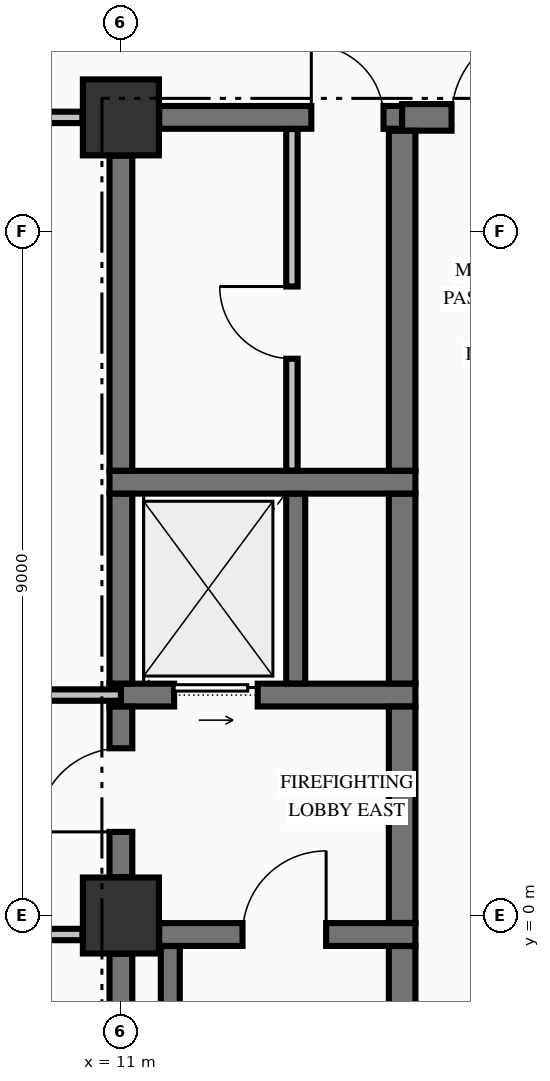
"""IFC4 building model, lengths in metres.
Left out: names, types, materials, properties, quantities, classifications, styles, units other than length and angle.
Written with IfcOpenShell. Run it as: python <this file> out.ifc"""

import sys

from ifc_helpers import new_model, si_unit, direction, frame, frame_2d, origin, origin_2d, place, context, subcontext, project, spatial, rectangle, extrude, element, fill, save


model = new_model("IFC4")
c1 = context("Model", 3, precision=1e-05, world=origin(), true_north=direction((0.0, 1.0)))
c2 = subcontext(c1, "Body", "Model", "MODEL_VIEW")
j1 = project(units=[si_unit("LENGTHUNIT", "METRE"), si_unit("PLANEANGLEUNIT", "RADIAN")], contexts=[c1])
p1 = place(None, origin())
s1 = spatial("IfcSite", under=j1, at=p1, CompositionType="ELEMENT")
p2 = place(p1, origin())
s2 = spatial("IfcBuilding", under=s1, at=p2, CompositionType="ELEMENT")
p3 = place(p2, frame((0.0, 0.0, 98.5)))
s3 = spatial("IfcBuildingStorey", under=s2, at=p3, CompositionType="ELEMENT", Elevation=98.5)
for number, where, z_axis, x_axis in (
    (1, (11.0, 0.0, -0.275), (0.0, 0.0, 1.0), (1.0, 0.0, 0.0)),
    (2, (11.0, 10.5, -0.275), (0.0, 0.0, 1.0), (1.0, 0.0, 0.0)),
):
    element("IfcColumn", number, at=place(p3, frame(where, z_axis=z_axis, x_axis=x_axis)), inside=s3, PredefinedType="COLUMN", context=c2, shape_type="SweptSolid", body=[
        extrude(rectangle(XDim=1.0, YDim=1.0, at=origin_2d()), origin(), (0.0, 0.0, 1.0), 3.595),
    ])
p4 = place(p3, frame((11.504, -0.25, 0.0), z_axis=(0.0, 0.0, 1.0), x_axis=(1.0, 0.0, 0.0)))
e3 = element("IfcWall", 3, at=p4, inside=s3, PredefinedType="SHEAR", context=c2, shape_type="SweptSolid", body=[
    extrude(rectangle(XDim=3.371, YDim=0.3, at=frame_2d((1.686, 0.0))), origin(), (0.0, 0.0, 1.0), 3.32),
])
p5 = place(p4, frame((1.096, 0.0, 0.0)))
e4 = element("IfcOpeningElement", 4, at=p5, cuts=e3, PredefinedType="OPENING", context=c2, shape_type="SweptSolid", body=[
    extrude(rectangle(XDim=1.1, YDim=2.15, at=frame_2d((0.55, 1.075))), frame((0.0, 0.16, 0.0), z_axis=(0.0, -1.0, 0.0), x_axis=(1.0, 0.0, 0.0)), (0.0, 0.0, 1.0), 0.32),
])
p6 = place(p3, frame((10.85, 2.9, 0.0), z_axis=(0.0, 0.0, 1.0), x_axis=(1.0, 0.0, 0.0)))
e5 = element("IfcWall", 5, at=p6, inside=s3, PredefinedType="SHEAR", context=c2, shape_type="SweptSolid", body=[
    extrude(rectangle(XDim=4.025, YDim=0.3, at=frame_2d((2.012, 0.0))), origin(), (0.0, 0.0, 1.0), 3.32),
])
p7 = place(p6, frame((0.85, 0.0, 0.0)))
e6 = element("IfcOpeningElement", 6, at=p7, cuts=e5, PredefinedType="OPENING", context=c2, shape_type="SweptSolid", body=[
    extrude(rectangle(XDim=1.1, YDim=2.2, at=frame_2d((0.55, 1.1))), frame((0.0, 0.16, 0.0), z_axis=(0.0, -1.0, 0.0), x_axis=(1.0, 0.0, 0.0)), (0.0, 0.0, 1.0), 0.32),
])
p8 = place(p3, frame((10.85, 5.7, 0.0), z_axis=(0.0, 0.0, 1.0), x_axis=(1.0, 0.0, 0.0)))
e7 = element("IfcWall", 7, at=p8, inside=s3, PredefinedType="SHEAR", context=c2, shape_type="SweptSolid", body=[
    extrude(rectangle(XDim=4.025, YDim=0.3, at=frame_2d((2.012, 0.0))), origin(), (0.0, 0.0, 1.0), 3.32),
])
p9 = place(p3, frame((11.504, 10.5, 0.0), z_axis=(0.0, 0.0, 1.0), x_axis=(1.0, 0.0, 0.0)))
e8 = element("IfcWall", 8, at=p9, inside=s3, PredefinedType="SHEAR", context=c2, shape_type="SweptSolid", body=[
    extrude(rectangle(XDim=3.196, YDim=0.3, at=frame_2d((1.598, 0.0))), origin(), (0.0, 0.0, 1.0), 3.32),
])
p10 = place(p9, frame((2.001, 0.0, 0.0)))
e9 = element("IfcOpeningElement", 9, at=p10, cuts=e8, PredefinedType="OPENING", context=c2, shape_type="SweptSolid", body=[
    extrude(rectangle(XDim=0.95, YDim=2.15, at=frame_2d((0.475, 1.075))), frame((0.0, 0.16, 0.0), z_axis=(0.0, -1.0, 0.0), x_axis=(1.0, 0.0, 0.0)), (0.0, 0.0, 1.0), 0.32),
])
p11 = place(p3, frame((14.7, 10.5, 0.0), z_axis=(0.0, 0.0, 1.0), x_axis=(1.0, 0.0, 0.0)))
e10 = element("IfcWall", 10, at=p11, inside=s3, PredefinedType="SHEAR", context=c2, shape_type="SweptSolid", body=[
    extrude(rectangle(XDim=4.796, YDim=0.35, at=frame_2d((2.398, 0.0))), origin(), (0.0, 0.0, 1.0), 3.32),
])
p12 = place(p11, frame((0.65, 0.0, 0.0)))
e11 = element("IfcOpeningElement", 11, at=p12, cuts=e10, PredefinedType="OPENING", context=c2, shape_type="SweptSolid", body=[
    extrude(rectangle(XDim=1.2, YDim=2.15, at=frame_2d((0.6, 1.075))), frame((0.0, 0.185, 0.0), z_axis=(0.0, -1.0, 0.0), x_axis=(1.0, 0.0, 0.0)), (0.0, 0.0, 1.0), 0.37),
])
p13 = place(p11, frame((3.25, 0.0, 0.0)))
e12 = element("IfcOpeningElement", 12, at=p13, cuts=e10, PredefinedType="OPENING", context=c2, shape_type="SweptSolid", body=[
    extrude(rectangle(XDim=0.9, YDim=2.15, at=frame_2d((0.45, 1.075))), frame((0.0, 0.185, 0.0), z_axis=(0.0, -1.0, 0.0), x_axis=(1.0, 0.0, 0.0)), (0.0, 0.0, 1.0), 0.37),
])
p14 = place(p3, frame((-10.494, -0.25, 0.0), z_axis=(0.0, 0.0, 1.0), x_axis=(1.0, 0.0, 0.0)))
e13 = element("IfcWall", 13, at=p14, inside=s3, PredefinedType="PARTITIONING", context=c2, shape_type="SweptSolid", body=[
    extrude(rectangle(XDim=20.988, YDim=0.15, at=frame_2d((10.494, 0.0))), origin(), (0.0, 0.0, 1.0), 3.32),
])
p15 = place(p14, frame((8.194, 0.0, 0.0)))
e14 = element("IfcOpeningElement", 14, at=p15, cuts=e13, PredefinedType="OPENING", context=c2, shape_type="SweptSolid", body=[
    extrude(rectangle(XDim=1.1, YDim=2.15, at=frame_2d((0.55, 1.075))), frame((0.0, 0.085, 0.0), z_axis=(0.0, -1.0, 0.0), x_axis=(1.0, 0.0, 0.0)), (0.0, 0.0, 1.0), 0.17),
])
p16 = place(p14, frame((3.049, 0.0, 0.0)))
e15 = element("IfcOpeningElement", 15, at=p16, cuts=e13, PredefinedType="OPENING", context=c2, shape_type="SweptSolid", body=[
    extrude(rectangle(XDim=1.05, YDim=2.15, at=frame_2d((0.525, 1.075))), frame((0.0, 0.085, 0.0), z_axis=(0.0, -1.0, 0.0), x_axis=(1.0, 0.0, 0.0)), (0.0, 0.0, 1.0), 0.17),
])
p17 = place(p14, frame((15.189, 0.0, 0.0)))
e16 = element("IfcOpeningElement", 16, at=p17, cuts=e13, PredefinedType="OPENING", context=c2, shape_type="SweptSolid", body=[
    extrude(rectangle(XDim=0.95, YDim=2.15, at=frame_2d((0.475, 1.075))), frame((0.0, 0.085, 0.0), z_axis=(0.0, -1.0, 0.0), x_axis=(1.0, 0.0, 0.0)), (0.0, 0.0, 1.0), 0.17),
])
p18 = place(p3, frame((-11.0, 2.9, 0.0), z_axis=(0.0, 0.0, 1.0), x_axis=(1.0, 0.0, 0.0)))
e17 = element("IfcWall", 17, at=p18, inside=s3, PredefinedType="PARTITIONING", context=c2, shape_type="SweptSolid", body=[
    extrude(rectangle(XDim=22.0, YDim=0.15, at=frame_2d((11.0, 0.0))), origin(), (0.0, 0.0, 1.0), 3.32),
])
p19 = place(p18, frame((8.7, 0.0, 0.0)))
e18 = element("IfcOpeningElement", 18, at=p19, cuts=e17, PredefinedType="OPENING", context=c2, shape_type="SweptSolid", body=[
    extrude(rectangle(XDim=1.1, YDim=2.15, at=frame_2d((0.55, 1.075))), frame((0.0, 0.085, 0.0), z_axis=(0.0, -1.0, 0.0), x_axis=(1.0, 0.0, 0.0)), (0.0, 0.0, 1.0), 0.17),
])
p20 = place(p18, frame((3.555, 0.0, 0.0)))
e19 = element("IfcOpeningElement", 19, at=p20, cuts=e17, PredefinedType="OPENING", context=c2, shape_type="SweptSolid", body=[
    extrude(rectangle(XDim=1.05, YDim=2.15, at=frame_2d((0.525, 1.075))), frame((0.0, 0.085, 0.0), z_axis=(0.0, -1.0, 0.0), x_axis=(1.0, 0.0, 0.0)), (0.0, 0.0, 1.0), 0.17),
])
p21 = place(p18, frame((15.62, 0.0, 0.0)))
e20 = element("IfcOpeningElement", 20, at=p21, cuts=e17, PredefinedType="OPENING", context=c2, shape_type="SweptSolid", body=[
    extrude(rectangle(XDim=1.1, YDim=2.15, at=frame_2d((0.55, 1.075))), frame((0.0, 0.085, 0.0), z_axis=(0.0, -1.0, 0.0), x_axis=(1.0, 0.0, 0.0)), (0.0, 0.0, 1.0), 0.17),
])
p22 = place(p3, frame((-10.494, 10.5, 0.0), z_axis=(0.0, 0.0, 1.0), x_axis=(1.0, 0.0, 0.0)))
e21 = element("IfcWall", 21, at=p22, inside=s3, PredefinedType="PARTITIONING", context=c2, shape_type="SweptSolid", body=[
    extrude(rectangle(XDim=20.988, YDim=0.15, at=frame_2d((10.494, 0.0))), origin(), (0.0, 0.0, 1.0), 3.32),
])
p23 = place(p22, frame((8.194, 0.0, 0.0)))
e22 = element("IfcOpeningElement", 22, at=p23, cuts=e21, PredefinedType="OPENING", context=c2, shape_type="SweptSolid", body=[
    extrude(rectangle(XDim=1.1, YDim=2.15, at=frame_2d((0.55, 1.075))), frame((0.0, 0.085, 0.0), z_axis=(0.0, -1.0, 0.0), x_axis=(1.0, 0.0, 0.0)), (0.0, 0.0, 1.0), 0.17),
])
p24 = place(p3, frame((11.0, -9.446, 0.0), z_axis=(0.0, 0.0, 1.0), x_axis=(0.0, 1.0, 0.0)))
e23 = element("IfcWall", 23, at=p24, inside=s3, PredefinedType="SHEAR", context=c2, shape_type="SweptSolid", body=[
    extrude(rectangle(XDim=8.942, YDim=0.3, at=frame_2d((4.471, 0.0))), origin(), (0.0, 0.0, 1.0), 3.32),
])
p25 = place(p3, frame((11.0, 0.504, 0.0), z_axis=(0.0, 0.0, 1.0), x_axis=(0.0, 1.0, 0.0)))
e24 = element("IfcWall", 24, at=p25, inside=s3, PredefinedType="SHEAR", context=c2, shape_type="SweptSolid", body=[
    extrude(rectangle(XDim=2.244, YDim=0.3, at=frame_2d((1.122, 0.0))), origin(), (0.0, 0.0, 1.0), 3.32),
])
p26 = place(p25, frame((0.596, 0.0, 0.0)))
e25 = element("IfcOpeningElement", 25, at=p26, cuts=e24, PredefinedType="OPENING", context=c2, shape_type="SweptSolid", body=[
    extrude(rectangle(XDim=1.1, YDim=2.15, at=frame_2d((0.55, 1.075))), frame((0.0, 0.16, 0.0), z_axis=(0.0, -1.0, 0.0), x_axis=(1.0, 0.0, 0.0)), (0.0, 0.0, 1.0), 0.32),
])
p27 = place(p3, frame((11.0, 3.052, 0.0), z_axis=(0.0, 0.0, 1.0), x_axis=(0.0, 1.0, 0.0)))
e26 = element("IfcWall", 26, at=p27, inside=s3, PredefinedType="SHEAR", context=c2, shape_type="SweptSolid", body=[
    extrude(rectangle(XDim=2.496, YDim=0.3, at=frame_2d((1.248, 0.0))), origin(), (0.0, 0.0, 1.0), 3.32),
])
p28 = place(p3, frame((11.0, 5.852, 0.0), z_axis=(0.0, 0.0, 1.0), x_axis=(0.0, 1.0, 0.0)))
e27 = element("IfcWall", 27, at=p28, inside=s3, PredefinedType="SHEAR", context=c2, shape_type="SweptSolid", body=[
    extrude(rectangle(XDim=4.144, YDim=0.3, at=frame_2d((2.072, 0.0))), origin(), (0.0, 0.0, 1.0), 3.32),
])
p29 = place(p3, frame((11.65, -9.798, 0.0), z_axis=(0.0, 0.0, 1.0), x_axis=(0.0, 1.0, 0.0)))
e28 = element("IfcWall", 28, at=p29, inside=s3, PredefinedType="SOLIDWALL", context=c2, shape_type="SweptSolid", body=[
    extrude(rectangle(XDim=9.396, YDim=0.25, at=frame_2d((4.698, 0.0))), origin(), (0.0, 0.0, 1.0), 3.32),
])
p30 = place(p3, frame((13.3, 3.052, 0.0), z_axis=(0.0, 0.0, 1.0), x_axis=(0.0, 1.0, 0.0)))
e29 = element("IfcWall", 29, at=p30, inside=s3, PredefinedType="SOLIDWALL", context=c2, shape_type="SweptSolid", body=[
    extrude(rectangle(XDim=2.496, YDim=0.25, at=frame_2d((1.248, 0.0))), origin(), (0.0, 0.0, 1.0), 3.32),
])
p31 = place(p3, frame((14.7, -9.773, 0.0), z_axis=(0.0, 0.0, 1.0), x_axis=(0.0, 1.0, 0.0)))
e30 = element("IfcWall", 30, at=p31, inside=s3, PredefinedType="SHEAR", context=c2, shape_type="SweptSolid", body=[
    extrude(rectangle(XDim=9.371, YDim=0.35, at=frame_2d((4.686, 0.0))), origin(), (0.0, 0.0, 1.0), 3.32),
])
p32 = place(p3, frame((14.7, -0.098, 0.0), z_axis=(0.0, 0.0, 1.0), x_axis=(0.0, 1.0, 0.0)))
e31 = element("IfcWall", 31, at=p32, inside=s3, PredefinedType="SHEAR", context=c2, shape_type="SweptSolid", body=[
    extrude(rectangle(XDim=2.846, YDim=0.35, at=frame_2d((1.423, 0.0))), origin(), (0.0, 0.0, 1.0), 3.32),
])
p33 = place(p3, frame((14.7, 3.052, 0.0), z_axis=(0.0, 0.0, 1.0), x_axis=(0.0, 1.0, 0.0)))
e32 = element("IfcWall", 32, at=p33, inside=s3, PredefinedType="SHEAR", context=c2, shape_type="SweptSolid", body=[
    extrude(rectangle(XDim=2.496, YDim=0.35, at=frame_2d((1.248, 0.0))), origin(), (0.0, 0.0, 1.0), 3.32),
])
p34 = place(p3, frame((14.7, 5.852, 0.0), z_axis=(0.0, 0.0, 1.0), x_axis=(0.0, 1.0, 0.0)))
e33 = element("IfcWall", 33, at=p34, inside=s3, PredefinedType="SHEAR", context=c2, shape_type="SweptSolid", body=[
    extrude(rectangle(XDim=4.471, YDim=0.35, at=frame_2d((2.235, 0.0))), origin(), (0.0, 0.0, 1.0), 3.32),
])
p35 = place(p3, frame((13.25, 5.853, 0.0), z_axis=(0.0, 0.0, 1.0), x_axis=(0.0, 1.0, 0.0)))
e34 = element("IfcWall", 34, at=p35, inside=s3, PredefinedType="PARTITIONING", context=c2, shape_type="SweptSolid", body=[
    extrude(rectangle(XDim=4.494, YDim=0.15, at=frame_2d((2.247, 0.0))), origin(), (0.0, 0.0, 1.0), 3.32),
])
p36 = place(p35, frame((1.472, 0.0, 0.0)))
e35 = element("IfcOpeningElement", 35, at=p36, cuts=e34, PredefinedType="OPENING", context=c2, shape_type="SweptSolid", body=[
    extrude(rectangle(XDim=0.95, YDim=2.15, at=frame_2d((0.475, 1.075))), frame((0.0, 0.085, 0.0), z_axis=(0.0, -1.0, 0.0), x_axis=(1.0, 0.0, 0.0)), (0.0, 0.0, 1.0), 0.17),
])
p37 = place(p5, origin())
e36 = element("IfcDoor", 36, at=p37, inside=s3, OperationType="SINGLE_SWING_RIGHT", PredefinedType="DOOR", context=c2, shape_type="SweptSolid", body=[
    extrude(rectangle(XDim=1.1, YDim=2.15, at=frame_2d((0.55, 1.075))), frame((0.0, 0.025, 0.0), z_axis=(0.0, -1.0, 0.0), x_axis=(1.0, 0.0, 0.0)), (0.0, 0.0, 1.0), 0.05),
])
fill(e4, e36)
p38 = place(p26, origin())
e37 = element("IfcDoor", 37, at=p38, inside=s3, OperationType="SINGLE_SWING_LEFT", PredefinedType="DOOR", context=c2, shape_type="SweptSolid", body=[
    extrude(rectangle(XDim=1.1, YDim=2.15, at=frame_2d((0.55, 1.075))), frame((0.0, 0.025, 0.0), z_axis=(0.0, -1.0, 0.0), x_axis=(1.0, 0.0, 0.0)), (0.0, 0.0, 1.0), 0.05),
])
fill(e25, e37)
p39 = place(p7, origin())
e38 = element("IfcDoor", 38, at=p39, inside=s3, OperationType="SLIDING_TO_RIGHT", PredefinedType="DOOR", context=c2, shape_type="SweptSolid", body=[
    extrude(rectangle(XDim=1.1, YDim=2.2, at=frame_2d((0.55, 1.1))), frame((0.0, 0.025, 0.0), z_axis=(0.0, -1.0, 0.0), x_axis=(1.0, 0.0, 0.0)), (0.0, 0.0, 1.0), 0.05),
])
fill(e6, e38)
p40 = place(p10, origin())
e39 = element("IfcDoor", 39, at=p40, inside=s3, OperationType="SINGLE_SWING_LEFT", PredefinedType="DOOR", context=c2, shape_type="SweptSolid", body=[
    extrude(rectangle(XDim=0.95, YDim=2.15, at=frame_2d((0.475, 1.075))), frame((0.0, 0.025, 0.0), z_axis=(0.0, -1.0, 0.0), x_axis=(1.0, 0.0, 0.0)), (0.0, 0.0, 1.0), 0.05),
])
fill(e9, e39)
p41 = place(p36, origin())
e40 = element("IfcDoor", 40, at=p41, inside=s3, OperationType="SINGLE_SWING_RIGHT", PredefinedType="DOOR", context=c2, shape_type="SweptSolid", body=[
    extrude(rectangle(XDim=0.95, YDim=2.15, at=frame_2d((0.475, 1.075))), frame((0.0, 0.025, 0.0), z_axis=(0.0, -1.0, 0.0), x_axis=(1.0, 0.0, 0.0)), (0.0, 0.0, 1.0), 0.05),
])
fill(e35, e40)
p42 = place(p12, origin())
e41 = element("IfcDoor", 41, at=p42, inside=s3, OperationType="SINGLE_SWING_RIGHT", PredefinedType="DOOR", context=c2, shape_type="SweptSolid", body=[
    extrude(rectangle(XDim=1.2, YDim=2.15, at=frame_2d((0.6, 1.075))), frame((0.0, 0.025, 0.0), z_axis=(0.0, -1.0, 0.0), x_axis=(1.0, 0.0, 0.0)), (0.0, 0.0, 1.0), 0.05),
])
fill(e11, e41)
save(model, sys.argv[1])
